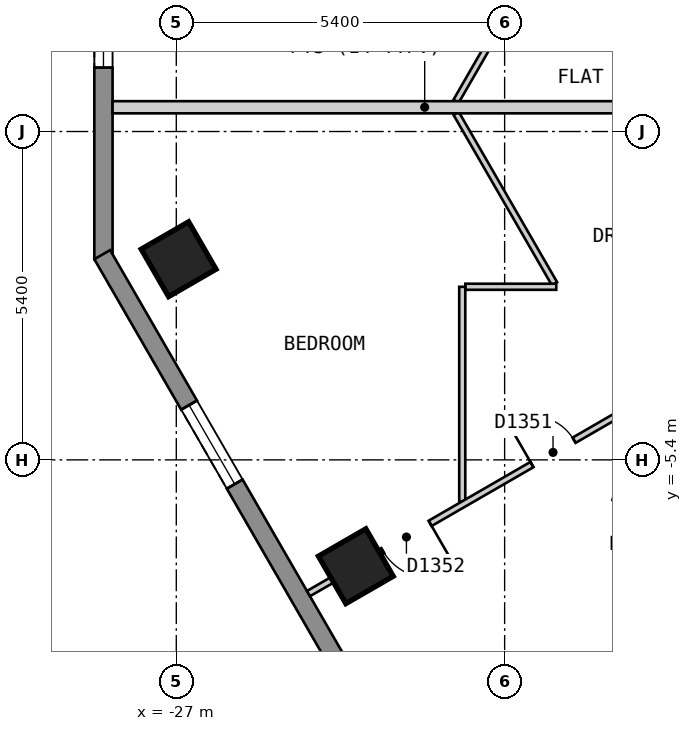
"""IFC4 building model, lengths in metres.
Left out: names, types, materials, properties, quantities, classifications, styles, units other than length and angle.
Written with IfcOpenShell. Run it as: python <this file> out.ifc"""

import sys

from ifc_helpers import new_model, si_unit, direction, frame, frame_2d, origin, origin_2d, place, context, subcontext, project, spatial, polyline, rectangle, outline, extrude, element, fill, save


model = new_model("IFC4")
c1 = context("Model", 3, precision=1e-05, world=origin(), true_north=direction((0.0, 1.0)))
c2 = subcontext(c1, "Body", "Model", "MODEL_VIEW")
j1 = project(units=[si_unit("LENGTHUNIT", "METRE"), si_unit("PLANEANGLEUNIT", "RADIAN")], contexts=[c1])
p1 = place(None, origin())
s1 = spatial("IfcSite", under=j1, at=p1, CompositionType="ELEMENT")
p2 = place(p1, origin())
s2 = spatial("IfcBuilding", under=s1, at=p2, CompositionType="ELEMENT")
p3 = place(p2, frame((0.0, 0.0, 135.6)))
s3 = spatial("IfcBuildingStorey", under=s2, at=p3, CompositionType="ELEMENT", Elevation=135.6)
for number, where, z_axis, x_axis in (
    (1, (-26.962, -2.1, 0.0), (0.0, 0.0, 1.0), (0.5, -0.866, 0.0)),
    (2, (-24.047, -7.149, 0.0), (0.0, 0.0, 1.0), (0.5, -0.866, 0.0)),
):
    element("IfcColumn", number, at=place(p3, frame(where, z_axis=z_axis, x_axis=x_axis)), inside=s3, PredefinedType="COLUMN", context=c2, shape_type="SweptSolid", body=[
        extrude(rectangle(XDim=0.9, YDim=0.9, at=origin_2d()), origin(), (0.0, 0.0, 1.0), 3.0),
    ])
p4 = place(p3, frame((-28.198, 2.9, 0.0), z_axis=(0.0, 0.0, 1.0), x_axis=(0.0, -1.0, 0.0)))
e3 = element("IfcWall", 3, at=p4, inside=s3, PredefinedType="SOLIDWALL", context=c2, shape_type="SweptSolid", body=[
    extrude(outline(polyline([(0.0, -0.15), (5.0, -0.15), (4.92, 0.15), (0.08, 0.15), (0.0, -0.15)])), origin(), (0.0, 0.0, 1.0), 2.7),
])
p5 = place(p4, frame((0.65, 0.0, 0.15)))
e4 = element("IfcOpeningElement", 4, at=p5, cuts=e3, PredefinedType="OPENING", context=c2, shape_type="SweptSolid", body=[
    extrude(rectangle(XDim=1.2, YDim=2.1, at=frame_2d((0.6, 1.05))), frame((0.0, 0.16, 0.0), z_axis=(0.0, -1.0, 0.0), x_axis=(1.0, 0.0, 0.0)), (0.0, 0.0, 1.0), 0.32),
])
p6 = place(p3, frame((-28.218, -2.025, 0.0), z_axis=(0.0, 0.0, 1.0), x_axis=(0.500017503135, -0.866015298109, 0.0)))
e5 = element("IfcWall", 5, at=p6, inside=s3, PredefinedType="SOLIDWALL", context=c2, shape_type="SweptSolid", body=[
    extrude(outline(polyline([(0.0, -0.15), (24.711, -0.15), (24.631, 0.15), (0.08, 0.15), (0.0, -0.15)])), origin(), (0.0, 0.0, 1.0), 2.7),
])
p7 = place(p6, frame((2.857, 0.0, 0.15)))
e6 = element("IfcOpeningElement", 6, at=p7, cuts=e5, PredefinedType="OPENING", context=c2, shape_type="SweptSolid", body=[
    extrude(rectangle(XDim=1.5, YDim=2.1, at=frame_2d((0.75, 1.05))), frame((0.0, 0.16, 0.0), z_axis=(0.0, -1.0, 0.0), x_axis=(1.0, 0.0, 0.0)), (0.0, 0.0, 1.0), 0.32),
])
p8 = place(p6, frame((8.689, 0.0, 0.15)))
e7 = element("IfcOpeningElement", 7, at=p8, cuts=e5, PredefinedType="OPENING", context=c2, shape_type="SweptSolid", body=[
    extrude(rectangle(XDim=1.5, YDim=2.1, at=frame_2d((0.75, 1.05))), frame((0.0, 0.16, 0.0), z_axis=(0.0, -1.0, 0.0), x_axis=(1.0, 0.0, 0.0)), (0.0, 0.0, 1.0), 0.32),
])
p9 = place(p6, frame((14.52, 0.0, 0.15)))
e8 = element("IfcOpeningElement", 8, at=p9, cuts=e5, PredefinedType="OPENING", context=c2, shape_type="SweptSolid", body=[
    extrude(rectangle(XDim=1.5, YDim=2.1, at=frame_2d((0.75, 1.05))), frame((0.0, 0.16, 0.0), z_axis=(0.0, -1.0, 0.0), x_axis=(1.0, 0.0, 0.0)), (0.0, 0.0, 1.0), 0.32),
])
p10 = place(p6, frame((20.351, 0.0, 0.15)))
e9 = element("IfcOpeningElement", 9, at=p10, cuts=e5, PredefinedType="OPENING", context=c2, shape_type="SweptSolid", body=[
    extrude(rectangle(XDim=1.5, YDim=2.1, at=frame_2d((0.75, 1.05))), frame((0.0, 0.16, 0.0), z_axis=(0.0, -1.0, 0.0), x_axis=(1.0, 0.0, 0.0)), (0.0, 0.0, 1.0), 0.32),
])
p11 = place(p3, frame((-22.398, 0.299, 0.0), z_axis=(0.0, 0.0, 1.0), x_axis=(0.50004249738, -0.86600086652, 0.0)))
e10 = element("IfcWall", 10, at=p11, inside=s3, PredefinedType="PARTITIONING", context=c2, shape_type="SweptSolid", body=[
    extrude(rectangle(XDim=3.236, YDim=0.1, at=frame_2d((1.618, 0.0))), origin(), (0.0, 0.0, 1.0), 2.7),
])
p12 = place(p3, frame((-21.083, 2.677, 0.0), z_axis=(0.0, 0.0, 1.0), x_axis=(0.867308690764, -0.497770664991, 0.0)))
e11 = element("IfcWall", 11, at=p12, inside=s3, PredefinedType="PARTITIONING", context=c2, shape_type="SweptSolid", body=[
    extrude(rectangle(XDim=3.897, YDim=0.1, at=frame_2d((1.949, 0.0))), origin(), (0.0, 0.0, 1.0), 2.7),
])
p13 = place(p12, frame((1.524, 0.0, 0.0)))
e12 = element("IfcOpeningElement", 12, at=p13, cuts=e11, PredefinedType="OPENING", context=c2, shape_type="SweptSolid", body=[
    extrude(rectangle(XDim=0.9, YDim=2.1, at=frame_2d((0.45, 1.05))), frame((0.0, 0.06, 0.0), z_axis=(0.0, -1.0, 0.0), x_axis=(1.0, 0.0, 0.0)), (0.0, 0.0, 1.0), 0.12),
])
p14 = place(p3, frame((-22.246, -2.553, 0.0), z_axis=(0.0, 0.0, 1.0), x_axis=(1.0, 0.0, 0.0)))
e13 = element("IfcWall", 13, at=p14, inside=s3, PredefinedType="PARTITIONING", context=c2, shape_type="SweptSolid", body=[
    extrude(rectangle(XDim=1.495, YDim=0.1, at=frame_2d((0.748, 0.0))), origin(), (0.0, 0.0, 1.0), 2.7),
])
p15 = place(p3, frame((-22.398, 0.499, 0.0), z_axis=(0.0, 0.0, 1.0), x_axis=(0.499984806807, 0.866034175401, 0.0)))
e14 = element("IfcWall", 14, at=p15, inside=s3, PredefinedType="PARTITIONING", context=c2, shape_type="SweptSolid", body=[
    extrude(rectangle(XDim=5.182, YDim=0.1, at=frame_2d((2.591, 0.0))), origin(), (0.0, 0.0, 1.0), 2.7),
])
p16 = place(p15, frame((2.943, 0.0, 0.0)))
e15 = element("IfcOpeningElement", 15, at=p16, cuts=e14, PredefinedType="OPENING", context=c2, shape_type="SweptSolid", body=[
    extrude(rectangle(XDim=0.9, YDim=2.1, at=frame_2d((0.45, 1.05))), frame((0.0, 0.06, 0.0), z_axis=(0.0, -1.0, 0.0), x_axis=(1.0, 0.0, 0.0)), (0.0, 0.0, 1.0), 0.12),
])
p17 = place(p3, frame((-22.297, -6.081, 0.0), z_axis=(0.0, 0.0, 1.0), x_axis=(0.0, 1.0, 0.0)))
e16 = element("IfcWall", 16, at=p17, inside=s3, PredefinedType="PARTITIONING", context=c2, shape_type="SweptSolid", body=[
    extrude(rectangle(XDim=3.527, YDim=0.1, at=frame_2d((1.764, 0.0))), origin(), (0.0, 0.0, 1.0), 2.7),
])
p18 = place(p3, frame((-24.826, -7.599, 0.0), z_axis=(0.0, 0.0, 1.0), x_axis=(0.866020686789, 0.500008169986, 0.0)))
e17 = element("IfcWall", 17, at=p18, inside=s3, PredefinedType="PARTITIONING", context=c2, shape_type="SweptSolid", body=[
    extrude(rectangle(XDim=10.01, YDim=0.1, at=frame_2d((5.005, 0.0))), origin(), (0.0, 0.0, 1.0), 2.7),
])
p19 = place(p18, frame((4.244, 0.0, 0.0)))
e18 = element("IfcOpeningElement", 18, at=p19, cuts=e17, PredefinedType="OPENING", context=c2, shape_type="SweptSolid", body=[
    extrude(rectangle(XDim=0.8, YDim=2.1, at=frame_2d((0.4, 1.05))), frame((0.0, 0.06, 0.0), z_axis=(0.0, -1.0, 0.0), x_axis=(1.0, 0.0, 0.0)), (0.0, 0.0, 1.0), 0.12),
])
p20 = place(p18, frame((1.41, 0.0, 0.0)))
e19 = element("IfcOpeningElement", 19, at=p20, cuts=e17, PredefinedType="OPENING", context=c2, shape_type="SweptSolid", body=[
    extrude(rectangle(XDim=0.9, YDim=2.1, at=frame_2d((0.45, 1.05))), frame((0.0, 0.06, 0.0), z_axis=(0.0, -1.0, 0.0), x_axis=(1.0, 0.0, 0.0)), (0.0, 0.0, 1.0), 0.12),
])
p21 = place(p3, frame((-28.048, 0.399, 0.0), z_axis=(0.0, 0.0, 1.0), x_axis=(1.0, 0.0, 0.0)))
e20 = element("IfcWall", 20, at=p21, inside=s3, PredefinedType="PARTITIONING", context=c2, shape_type="SweptSolid", body=[
    extrude(rectangle(XDim=10.266, YDim=0.2, at=frame_2d((5.133, 0.0))), origin(), (0.0, 0.0, 1.0), 2.7),
])
p22 = place(p5, origin())
e21 = element("IfcWindow", 21, at=p22, inside=s3, PartitioningType="SINGLE_PANEL", PredefinedType="WINDOW", context=c2, shape_type="SweptSolid", body=[
    extrude(rectangle(XDim=1.2, YDim=2.1, at=frame_2d((0.6, 1.05))), frame((0.0, 0.03, 0.0), z_axis=(0.0, -1.0, 0.0), x_axis=(1.0, 0.0, 0.0)), (0.0, 0.0, 1.0), 0.06),
])
fill(e4, e21)
p23 = place(p7, origin())
e22 = element("IfcWindow", 22, at=p23, inside=s3, PartitioningType="SINGLE_PANEL", PredefinedType="WINDOW", context=c2, shape_type="SweptSolid", body=[
    extrude(rectangle(XDim=1.5, YDim=2.1, at=frame_2d((0.75, 1.05))), frame((0.0, 0.03, 0.0), z_axis=(0.0, -1.0, 0.0), x_axis=(1.0, 0.0, 0.0)), (0.0, 0.0, 1.0), 0.06),
])
fill(e6, e22)
p24 = place(p19, origin())
e23 = element("IfcDoor", 23, at=p24, inside=s3, OperationType="SINGLE_SWING_LEFT", PredefinedType="DOOR", context=c2, shape_type="SweptSolid", body=[
    extrude(rectangle(XDim=0.8, YDim=2.1, at=frame_2d((0.4, 1.05))), frame((0.0, 0.025, 0.0), z_axis=(0.0, -1.0, 0.0), x_axis=(1.0, 0.0, 0.0)), (0.0, 0.0, 1.0), 0.05),
])
fill(e18, e23)
p25 = place(p20, origin())
e24 = element("IfcDoor", 24, at=p25, inside=s3, OperationType="SINGLE_SWING_RIGHT", PredefinedType="DOOR", context=c2, shape_type="SweptSolid", body=[
    extrude(rectangle(XDim=0.9, YDim=2.1, at=frame_2d((0.45, 1.05))), frame((0.0, 0.025, 0.0), z_axis=(0.0, -1.0, 0.0), x_axis=(1.0, 0.0, 0.0)), (0.0, 0.0, 1.0), 0.05),
])
fill(e19, e24)
save(model, sys.argv[1])
